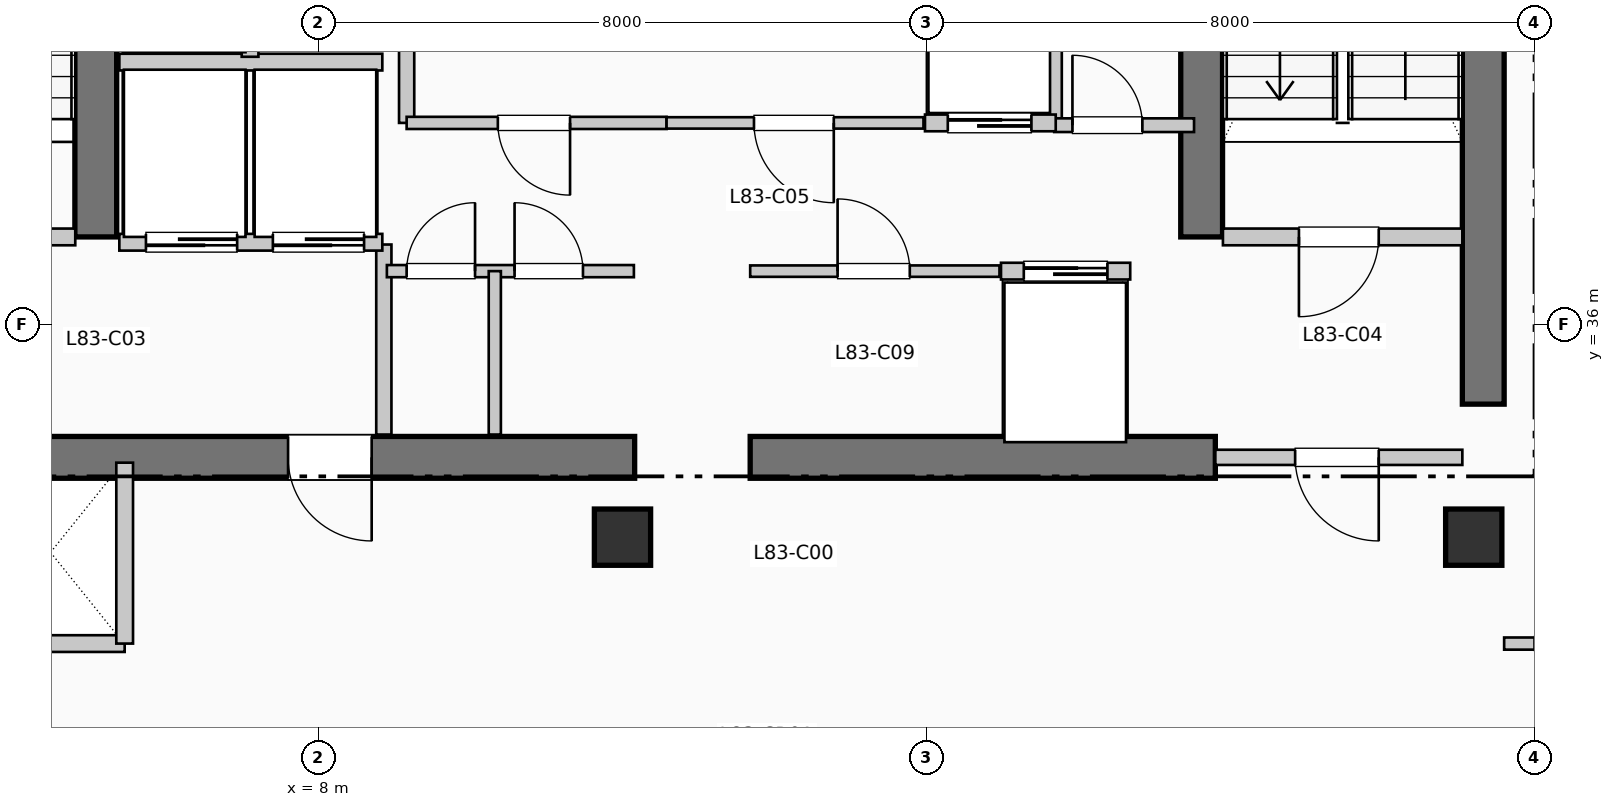
"""IFC4 building model, lengths in metres.
Left out: names, types, materials, properties, quantities, classifications, styles, units other than length and angle.
Written with IfcOpenShell. Run it as: python <this file> out.ifc"""

import sys

from ifc_helpers import new_model, si_unit, direction, frame, frame_2d, origin, origin_2d, place, context, subcontext, project, spatial, rectangle, extrude, element, fill, save


model = new_model("IFC4")
c1 = context("Model", 3, precision=1e-05, world=origin(), true_north=direction((0.0, 1.0)))
c2 = subcontext(c1, "Body", "Model", "MODEL_VIEW")
j1 = project(units=[si_unit("LENGTHUNIT", "METRE"), si_unit("PLANEANGLEUNIT", "RADIAN")], contexts=[c1])
p1 = place(None, origin())
s1 = spatial("IfcSite", under=j1, at=p1, CompositionType="ELEMENT")
p2 = place(p1, origin())
s2 = spatial("IfcBuilding", under=s1, at=p2, CompositionType="ELEMENT")
p3 = place(p2, frame((0.0, 0.0, 339.57)))
s3 = spatial("IfcBuildingStorey", under=s2, at=p3, CompositionType="ELEMENT", Elevation=339.57)
p4 = place(p3, frame((23.325, 34.95, 0.0), z_axis=(0.0, 0.0, 1.0), x_axis=(0.0, 1.0, 0.0)))
e1 = element("IfcWall", 1, at=p4, inside=s3, PredefinedType="SHEAR", context=c2, shape_type="SweptSolid", body=[
    extrude(rectangle(XDim=10.64, YDim=0.55, at=frame_2d((5.32, 0.0))), origin(), (0.0, 0.0, 1.0), 3.96),
])
p5 = place(p3, frame((1.45, 34.25, 0.0), z_axis=(0.0, 0.0, 1.0), x_axis=(1.0, 0.0, 0.0)))
e2 = element("IfcWall", 2, at=p5, inside=s3, PredefinedType="SHEAR", context=c2, shape_type="SweptSolid", body=[
    extrude(rectangle(XDim=10.71, YDim=0.55, at=frame_2d((5.355, 0.0))), origin(), (0.0, 0.0, 1.0), 3.96),
])
p6 = place(p5, frame((7.25, 0.0, 0.0), z_axis=(0.0, 0.0, 1.0), x_axis=(-1.0, 0.0, 0.0)))
e3 = element("IfcOpeningElement", 3, at=p6, cuts=e2, PredefinedType="OPENING", context=c2, shape_type="SweptSolid", body=[
    extrude(rectangle(XDim=1.1, YDim=2.15, at=frame_2d((0.55, 1.075))), frame((0.0, 0.285, 0.0), z_axis=(0.0, -1.0, 0.0), x_axis=(1.0, 0.0, 0.0)), (0.0, 0.0, 1.0), 0.57),
])
p7 = place(p3, frame((13.68, 34.25, 0.0), z_axis=(0.0, 0.0, 1.0), x_axis=(1.0, 0.0, 0.0)))
e4 = element("IfcWall", 4, at=p7, inside=s3, PredefinedType="SHEAR", context=c2, shape_type="SweptSolid", body=[
    extrude(rectangle(XDim=6.12, YDim=0.55, at=frame_2d((3.06, 0.0))), origin(), (0.0, 0.0, 1.0), 3.96),
])
for number, where, z_axis, x_axis in (
    (5, (5.07, 37.15, 0.0), (0.0, 0.0, 1.0), (0.0, 1.0, 0.0)),
    (6, (19.62, 37.15, 0.0), (0.0, 0.0, 1.0), (0.0, 1.0, 0.0)),
):
    element("IfcWall", number, at=place(p3, frame(where, z_axis=z_axis, x_axis=x_axis)), inside=s3, PredefinedType="SHEAR", context=c2, shape_type="SweptSolid", body=[
        extrude(rectangle(XDim=7.89, YDim=0.55, at=frame_2d((3.945, 0.0))), origin(), (0.0, 0.0, 1.0), 3.96),
    ])
for number, where, z_axis, x_axis in (
    (7, (12.0, 33.2, 0.0), (0.0, 0.0, 1.0), (1.0, 0.0, 0.0)),
    (8, (23.2, 33.2, 0.0), (0.0, 0.0, 1.0), (1.0, 0.0, 0.0)),
):
    element("IfcColumn", number, at=place(p3, frame(where, z_axis=z_axis, x_axis=x_axis)), inside=s3, PredefinedType="COLUMN", context=c2, shape_type="SweptSolid", body=[
        extrude(rectangle(XDim=0.74, YDim=0.74, at=origin_2d()), origin(), (0.0, 0.0, 1.0), 3.96),
    ])
p8 = place(p3, frame((1.65, 37.15, 0.0), z_axis=(0.0, 0.0, 1.0), x_axis=(1.0, 0.0, 0.0)))
e9 = element("IfcWall", 9, at=p8, inside=s3, PredefinedType="PARTITIONING", context=c2, shape_type="SweptSolid", body=[
    extrude(rectangle(XDim=3.15, YDim=0.22, at=frame_2d((1.575, 0.0))), origin(), (0.0, 0.0, 1.0), 3.74),
])
p9 = place(p8, frame((2.05, 0.0, 0.0), z_axis=(0.0, 0.0, 1.0), x_axis=(-1.0, 0.0, 0.0)))
e10 = element("IfcOpeningElement", 10, at=p9, cuts=e9, PredefinedType="OPENING", context=c2, shape_type="SweptSolid", body=[
    extrude(rectangle(XDim=1.05, YDim=2.15, at=frame_2d((0.525, 1.075))), frame((0.0, 0.12, 0.0), z_axis=(0.0, -1.0, 0.0), x_axis=(1.0, 0.0, 0.0)), (0.0, 0.0, 1.0), 0.24),
])
p10 = place(p3, frame((8.86, 34.55, 0.0), z_axis=(0.0, 0.0, 1.0), x_axis=(0.0, 1.0, 0.0)))
e11 = element("IfcWall", 11, at=p10, inside=s3, PredefinedType="PARTITIONING", context=c2, shape_type="SweptSolid", body=[
    extrude(rectangle(XDim=2.5, YDim=0.2, at=frame_2d((1.25, 0.0))), origin(), (0.0, 0.0, 1.0), 3.74),
])
p11 = place(p3, frame((19.9, 37.15, 0.0), z_axis=(0.0, 0.0, 1.0), x_axis=(1.0, 0.0, 0.0)))
e12 = element("IfcWall", 12, at=p11, inside=s3, PredefinedType="PARTITIONING", context=c2, shape_type="SweptSolid", body=[
    extrude(rectangle(XDim=3.15, YDim=0.22, at=frame_2d((1.575, 0.0))), origin(), (0.0, 0.0, 1.0), 3.74),
])
p12 = place(p11, frame((2.05, 0.0, 0.0), z_axis=(0.0, 0.0, 1.0), x_axis=(-1.0, 0.0, 0.0)))
e13 = element("IfcOpeningElement", 13, at=p12, cuts=e12, PredefinedType="OPENING", context=c2, shape_type="SweptSolid", body=[
    extrude(rectangle(XDim=1.05, YDim=2.15, at=frame_2d((0.525, 1.075))), frame((0.0, 0.12, 0.0), z_axis=(0.0, -1.0, 0.0), x_axis=(1.0, 0.0, 0.0)), (0.0, 0.0, 1.0), 0.24),
])
p13 = place(p3, frame((19.8, 34.25, 0.0), z_axis=(0.0, 0.0, 1.0), x_axis=(1.0, 0.0, 0.0)))
e14 = element("IfcWall", 14, at=p13, inside=s3, PredefinedType="PARTITIONING", context=c2, shape_type="SweptSolid", body=[
    extrude(rectangle(XDim=3.25, YDim=0.2, at=frame_2d((1.625, 0.0))), origin(), (0.0, 0.0, 1.0), 3.74),
])
p14 = place(p13, frame((2.15, 0.0, 0.0), z_axis=(0.0, 0.0, 1.0), x_axis=(-1.0, 0.0, 0.0)))
e15 = element("IfcOpeningElement", 15, at=p14, cuts=e14, PredefinedType="OPENING", context=c2, shape_type="SweptSolid", body=[
    extrude(rectangle(XDim=1.1, YDim=2.15, at=frame_2d((0.55, 1.075))), frame((0.0, 0.11, 0.0), z_axis=(0.0, -1.0, 0.0), x_axis=(1.0, 0.0, 0.0)), (0.0, 0.0, 1.0), 0.22),
])
p15 = place(p3, frame((5.38, 37.08, 0.0), z_axis=(0.0, 0.0, 1.0), x_axis=(1.0, 0.0, 0.0)))
e16 = element("IfcWall", 16, at=p15, inside=s3, PredefinedType="PARTITIONING", context=c2, shape_type="SweptSolid", body=[
    extrude(rectangle(XDim=3.46, YDim=0.22, at=frame_2d((1.73, 0.0))), origin(), (0.0, 0.0, 1.0), 3.74),
])
p16 = place(p15, frame((1.55, 0.0, 0.0), z_axis=(0.0, 0.0, 1.0), x_axis=(-1.0, 0.0, 0.0)))
e17 = element("IfcOpeningElement", 17, at=p16, cuts=e16, PredefinedType="OPENING", context=c2, shape_type="SweptSolid", body=[
    extrude(rectangle(XDim=1.2, YDim=2.2, at=frame_2d((0.6, 1.1))), frame((0.0, 0.12, 0.0), z_axis=(0.0, -1.0, 0.0), x_axis=(1.0, 0.0, 0.0)), (0.0, 0.0, 1.0), 0.24),
])
p17 = place(p15, frame((3.22, 0.0, 0.0), z_axis=(0.0, 0.0, 1.0), x_axis=(-1.0, 0.0, 0.0)))
e18 = element("IfcOpeningElement", 18, at=p17, cuts=e16, PredefinedType="OPENING", context=c2, shape_type="SweptSolid", body=[
    extrude(rectangle(XDim=1.2, YDim=2.2, at=frame_2d((0.6, 1.1))), frame((0.0, 0.12, 0.0), z_axis=(0.0, -1.0, 0.0), x_axis=(1.0, 0.0, 0.0)), (0.0, 0.0, 1.0), 0.24),
])
p18 = place(p3, frame((5.38, 39.45, 0.0), z_axis=(0.0, 0.0, 1.0), x_axis=(1.0, 0.0, 0.0)))
e19 = element("IfcWall", 19, at=p18, inside=s3, PredefinedType="PARTITIONING", context=c2, shape_type="SweptSolid", body=[
    extrude(rectangle(XDim=3.46, YDim=0.22, at=frame_2d((1.73, 0.0))), origin(), (0.0, 0.0, 1.0), 3.74),
])
p19 = place(p3, frame((7.1, 39.52, 0.0), z_axis=(0.0, 0.0, 1.0), x_axis=(0.0, 1.0, 0.0)))
e20 = element("IfcWall", 20, at=p19, inside=s3, PredefinedType="PARTITIONING", context=c2, shape_type="SweptSolid", body=[
    extrude(rectangle(XDim=2.93, YDim=0.22, at=frame_2d((1.465, 0.0))), origin(), (0.0, 0.0, 1.0), 3.74),
])
p20 = place(p19, frame((0.85, 0.0, 0.0)))
e21 = element("IfcOpeningElement", 21, at=p20, cuts=e20, PredefinedType="OPENING", context=c2, shape_type="SweptSolid", body=[
    extrude(rectangle(XDim=1.1, YDim=2.2, at=frame_2d((0.55, 1.1))), frame((0.0, 0.12, 0.0), z_axis=(0.0, -1.0, 0.0), x_axis=(1.0, 0.0, 0.0)), (0.0, 0.0, 1.0), 0.24),
])
p21 = place(p3, frame((1.55, 31.8, 0.0), z_axis=(0.0, 0.0, 1.0), x_axis=(1.0, 0.0, 0.0)))
e22 = element("IfcWall", 22, at=p21, inside=s3, PredefinedType="PARTITIONING", context=c2, shape_type="SweptSolid", body=[
    extrude(rectangle(XDim=3.9, YDim=0.22, at=frame_2d((1.95, 0.0))), origin(), (0.0, 0.0, 1.0), 3.74),
])
p22 = place(p3, frame((5.45, 31.8, 0.0), z_axis=(0.0, 0.0, 1.0), x_axis=(0.0, 1.0, 0.0)))
e23 = element("IfcWall", 23, at=p22, inside=s3, PredefinedType="PARTITIONING", context=c2, shape_type="SweptSolid", body=[
    extrude(rectangle(XDim=2.38, YDim=0.22, at=frame_2d((1.19, 0.0))), origin(), (0.0, 0.0, 1.0), 3.74),
])
for number, where, z_axis, x_axis in (
    (24, (9.16, 38.65, 0.0), (0.0, 0.0, 1.0), (0.0, 1.0, 0.0)),
    (25, (17.68, 38.65, 0.0), (0.0, 0.0, 1.0), (0.0, 1.0, 0.0)),
):
    element("IfcWall", number, at=place(p3, frame(where, z_axis=z_axis, x_axis=x_axis)), inside=s3, PredefinedType="PARTITIONING", context=c2, shape_type="SweptSolid", body=[
        extrude(rectangle(XDim=2.35, YDim=0.2, at=frame_2d((1.175, 0.0))), origin(), (0.0, 0.0, 1.0), 3.74),
    ])
p23 = place(p3, frame((17.68, 38.62, 0.0), z_axis=(0.0, 0.0, 1.0), x_axis=(1.0, 0.0, 0.0)))
e26 = element("IfcWall", 26, at=p23, inside=s3, PredefinedType="PARTITIONING", context=c2, shape_type="SweptSolid", body=[
    extrude(rectangle(XDim=1.84, YDim=0.18, at=frame_2d((0.92, 0.0))), origin(), (0.0, 0.0, 1.0), 3.74),
])
p24 = place(p23, frame((0.24, 0.0, 0.0)))
e27 = element("IfcOpeningElement", 27, at=p24, cuts=e26, PredefinedType="OPENING", context=c2, shape_type="SweptSolid", body=[
    extrude(rectangle(XDim=0.92, YDim=2.1, at=frame_2d((0.46, 1.05))), frame((0.0, 0.1, 0.0), z_axis=(0.0, -1.0, 0.0), x_axis=(1.0, 0.0, 0.0)), (0.0, 0.0, 1.0), 0.2),
])
p25 = place(p3, frame((8.9, 36.7, 0.0), z_axis=(0.0, 0.0, 1.0), x_axis=(1.0, 0.0, 0.0)))
e28 = element("IfcWall", 28, at=p25, inside=s3, PredefinedType="PARTITIONING", context=c2, shape_type="SweptSolid", body=[
    extrude(rectangle(XDim=3.25, YDim=0.16, at=frame_2d((1.625, 0.0))), origin(), (0.0, 0.0, 1.0), 3.74),
])
p26 = place(p25, frame((0.26, 0.0, 0.0)))
e29 = element("IfcOpeningElement", 29, at=p26, cuts=e28, PredefinedType="OPENING", context=c2, shape_type="SweptSolid", body=[
    extrude(rectangle(XDim=0.9, YDim=2.15, at=frame_2d((0.45, 1.075))), frame((0.0, 0.09, 0.0), z_axis=(0.0, -1.0, 0.0), x_axis=(1.0, 0.0, 0.0)), (0.0, 0.0, 1.0), 0.18),
])
p27 = place(p25, frame((1.68, 0.0, 0.0)))
e30 = element("IfcOpeningElement", 30, at=p27, cuts=e28, PredefinedType="OPENING", context=c2, shape_type="SweptSolid", body=[
    extrude(rectangle(XDim=0.9, YDim=2.15, at=frame_2d((0.45, 1.075))), frame((0.0, 0.09, 0.0), z_axis=(0.0, -1.0, 0.0), x_axis=(1.0, 0.0, 0.0)), (0.0, 0.0, 1.0), 0.18),
])
p28 = place(p3, frame((10.32, 34.55, 0.0), z_axis=(0.0, 0.0, 1.0), x_axis=(0.0, 1.0, 0.0)))
e31 = element("IfcWall", 31, at=p28, inside=s3, PredefinedType="PARTITIONING", context=c2, shape_type="SweptSolid", body=[
    extrude(rectangle(XDim=2.15, YDim=0.16, at=frame_2d((1.075, 0.0))), origin(), (0.0, 0.0, 1.0), 3.74),
])
p29 = place(p3, frame((9.16, 38.65, 0.0), z_axis=(0.0, 0.0, 1.0), x_axis=(1.0, 0.0, 0.0)))
e32 = element("IfcWall", 32, at=p29, inside=s3, PredefinedType="PARTITIONING", context=c2, shape_type="SweptSolid", body=[
    extrude(rectangle(XDim=3.42, YDim=0.16, at=frame_2d((1.71, 0.0))), origin(), (0.0, 0.0, 1.0), 3.74),
])
p30 = place(p29, frame((2.15, 0.0, 0.0), z_axis=(0.0, 0.0, 1.0), x_axis=(-1.0, 0.0, 0.0)))
e33 = element("IfcOpeningElement", 33, at=p30, cuts=e32, PredefinedType="OPENING", context=c2, shape_type="SweptSolid", body=[
    extrude(rectangle(XDim=0.95, YDim=2.15, at=frame_2d((0.475, 1.075))), frame((0.0, 0.09, 0.0), z_axis=(0.0, -1.0, 0.0), x_axis=(1.0, 0.0, 0.0)), (0.0, 0.0, 1.0), 0.18),
])
p31 = place(p3, frame((13.68, 36.7, 0.0), z_axis=(0.0, 0.0, 1.0), x_axis=(1.0, 0.0, 0.0)))
e34 = element("IfcWall", 34, at=p31, inside=s3, PredefinedType="PARTITIONING", context=c2, shape_type="SweptSolid", body=[
    extrude(rectangle(XDim=3.28, YDim=0.15, at=frame_2d((1.64, 0.0))), origin(), (0.0, 0.0, 1.0), 3.74),
])
p32 = place(p31, frame((1.15, 0.0, 0.0)))
e35 = element("IfcOpeningElement", 35, at=p32, cuts=e34, PredefinedType="OPENING", context=c2, shape_type="SweptSolid", body=[
    extrude(rectangle(XDim=0.95, YDim=2.15, at=frame_2d((0.475, 1.075))), frame((0.0, 0.085, 0.0), z_axis=(0.0, -1.0, 0.0), x_axis=(1.0, 0.0, 0.0)), (0.0, 0.0, 1.0), 0.17),
])
p33 = place(p3, frame((12.58, 38.65, 0.0), z_axis=(0.0, 0.0, 1.0), x_axis=(1.0, 0.0, 0.0)))
e36 = element("IfcWall", 36, at=p33, inside=s3, PredefinedType="PARTITIONING", context=c2, shape_type="SweptSolid", body=[
    extrude(rectangle(XDim=3.38, YDim=0.15, at=frame_2d((1.69, 0.0))), origin(), (0.0, 0.0, 1.0), 3.74),
])
p34 = place(p33, frame((2.2, 0.0, 0.0), z_axis=(0.0, 0.0, 1.0), x_axis=(-1.0, 0.0, 0.0)))
e37 = element("IfcOpeningElement", 37, at=p34, cuts=e36, PredefinedType="OPENING", context=c2, shape_type="SweptSolid", body=[
    extrude(rectangle(XDim=1.05, YDim=2.15, at=frame_2d((0.525, 1.075))), frame((0.0, 0.085, 0.0), z_axis=(0.0, -1.0, 0.0), x_axis=(1.0, 0.0, 0.0)), (0.0, 0.0, 1.0), 0.17),
])
p35 = place(p3, frame((16.98, 36.7, 0.0), z_axis=(0.0, 0.0, 1.0), x_axis=(1.0, 0.0, 0.0)))
e38 = element("IfcWall", 38, at=p35, inside=s3, PredefinedType="PARTITIONING", context=c2, shape_type="SweptSolid", body=[
    extrude(rectangle(XDim=1.7, YDim=0.22, at=frame_2d((0.85, 0.0))), origin(), (0.0, 0.0, 1.0), 3.74),
])
p36 = place(p35, frame((0.3, 0.0, 0.0)))
e39 = element("IfcOpeningElement", 39, at=p36, cuts=e38, PredefinedType="OPENING", context=c2, shape_type="SweptSolid", body=[
    extrude(rectangle(XDim=1.1, YDim=2.2, at=frame_2d((0.55, 1.1))), frame((0.0, 0.12, 0.0), z_axis=(0.0, -1.0, 0.0), x_axis=(1.0, 0.0, 0.0)), (0.0, 0.0, 1.0), 0.24),
])
p37 = place(p3, frame((15.98, 38.65, 0.0), z_axis=(0.0, 0.0, 1.0), x_axis=(1.0, 0.0, 0.0)))
e40 = element("IfcWall", 40, at=p37, inside=s3, PredefinedType="PARTITIONING", context=c2, shape_type="SweptSolid", body=[
    extrude(rectangle(XDim=1.72, YDim=0.22, at=frame_2d((0.86, 0.0))), origin(), (0.0, 0.0, 1.0), 3.74),
])
p38 = place(p37, frame((0.3, 0.0, 0.0)))
e41 = element("IfcOpeningElement", 41, at=p38, cuts=e40, PredefinedType="OPENING", context=c2, shape_type="SweptSolid", body=[
    extrude(rectangle(XDim=1.1, YDim=2.2, at=frame_2d((0.55, 1.1))), frame((0.0, 0.12, 0.0), z_axis=(0.0, -1.0, 0.0), x_axis=(1.0, 0.0, 0.0)), (0.0, 0.0, 1.0), 0.24),
])
p39 = place(p3, frame((23.6, 31.8, 0.0), z_axis=(0.0, 0.0, 1.0), x_axis=(1.0, 0.0, 0.0)))
e42 = element("IfcWall", 42, at=p39, inside=s3, PredefinedType="PARTITIONING", context=c2, shape_type="SweptSolid", body=[
    extrude(rectangle(XDim=1.8, YDim=0.16, at=frame_2d((0.9, 0.0))), origin(), (0.0, 0.0, 1.0), 3.74),
])
p40 = place(p39, frame((0.4, 0.0, 0.0)))
e43 = element("IfcOpeningElement", 43, at=p40, cuts=e42, PredefinedType="OPENING", context=c2, shape_type="SweptSolid", body=[
    extrude(rectangle(XDim=0.92, YDim=2.1, at=frame_2d((0.46, 1.05))), frame((0.0, 0.09, 0.0), z_axis=(0.0, -1.0, 0.0), x_axis=(1.0, 0.0, 0.0)), (0.0, 0.0, 1.0), 0.18),
])
p41 = place(p6, origin())
e44 = element("IfcDoor", 44, at=p41, inside=s3, OperationType="SINGLE_SWING_RIGHT", PredefinedType="DOOR", context=c2, shape_type="SweptSolid", body=[
    extrude(rectangle(XDim=1.1, YDim=2.15, at=frame_2d((0.55, 1.075))), frame((0.0, 0.025, 0.0), z_axis=(0.0, -1.0, 0.0), x_axis=(1.0, 0.0, 0.0)), (0.0, 0.0, 1.0), 0.05),
])
fill(e3, e44)
p42 = place(p12, origin())
e45 = element("IfcDoor", 45, at=p42, inside=s3, OperationType="SINGLE_SWING_LEFT", PredefinedType="DOOR", context=c2, shape_type="SweptSolid", body=[
    extrude(rectangle(XDim=1.05, YDim=2.15, at=frame_2d((0.525, 1.075))), frame((0.0, 0.025, 0.0), z_axis=(0.0, -1.0, 0.0), x_axis=(1.0, 0.0, 0.0)), (0.0, 0.0, 1.0), 0.05),
])
fill(e13, e45)
p43 = place(p14, origin())
e46 = element("IfcDoor", 46, at=p43, inside=s3, OperationType="SINGLE_SWING_RIGHT", PredefinedType="DOOR", context=c2, shape_type="SweptSolid", body=[
    extrude(rectangle(XDim=1.1, YDim=2.15, at=frame_2d((0.55, 1.075))), frame((0.0, 0.025, 0.0), z_axis=(0.0, -1.0, 0.0), x_axis=(1.0, 0.0, 0.0)), (0.0, 0.0, 1.0), 0.05),
])
fill(e15, e46)
p44 = place(p16, origin())
e47 = element("IfcDoor", 47, at=p44, inside=s3, OperationType="SLIDING_TO_RIGHT", PredefinedType="DOOR", context=c2, shape_type="SweptSolid", body=[
    extrude(rectangle(XDim=1.2, YDim=2.2, at=frame_2d((0.6, 1.1))), frame((0.0, 0.025, 0.0), z_axis=(0.0, -1.0, 0.0), x_axis=(1.0, 0.0, 0.0)), (0.0, 0.0, 1.0), 0.05),
])
fill(e17, e47)
p45 = place(p17, origin())
e48 = element("IfcDoor", 48, at=p45, inside=s3, OperationType="SLIDING_TO_RIGHT", PredefinedType="DOOR", context=c2, shape_type="SweptSolid", body=[
    extrude(rectangle(XDim=1.2, YDim=2.2, at=frame_2d((0.6, 1.1))), frame((0.0, 0.025, 0.0), z_axis=(0.0, -1.0, 0.0), x_axis=(1.0, 0.0, 0.0)), (0.0, 0.0, 1.0), 0.05),
])
fill(e18, e48)
p46 = place(p24, origin())
e49 = element("IfcDoor", 49, at=p46, inside=s3, OperationType="SINGLE_SWING_LEFT", PredefinedType="DOOR", context=c2, shape_type="SweptSolid", body=[
    extrude(rectangle(XDim=0.92, YDim=2.1, at=frame_2d((0.46, 1.05))), frame((0.0, 0.025, 0.0), z_axis=(0.0, -1.0, 0.0), x_axis=(1.0, 0.0, 0.0)), (0.0, 0.0, 1.0), 0.05),
])
fill(e27, e49)
p47 = place(p26, origin())
e50 = element("IfcDoor", 50, at=p47, inside=s3, OperationType="SINGLE_SWING_RIGHT", PredefinedType="DOOR", context=c2, shape_type="SweptSolid", body=[
    extrude(rectangle(XDim=0.9, YDim=2.15, at=frame_2d((0.45, 1.075))), frame((0.0, 0.025, 0.0), z_axis=(0.0, -1.0, 0.0), x_axis=(1.0, 0.0, 0.0)), (0.0, 0.0, 1.0), 0.05),
])
fill(e29, e50)
p48 = place(p27, origin())
e51 = element("IfcDoor", 51, at=p48, inside=s3, OperationType="SINGLE_SWING_LEFT", PredefinedType="DOOR", context=c2, shape_type="SweptSolid", body=[
    extrude(rectangle(XDim=0.9, YDim=2.15, at=frame_2d((0.45, 1.075))), frame((0.0, 0.025, 0.0), z_axis=(0.0, -1.0, 0.0), x_axis=(1.0, 0.0, 0.0)), (0.0, 0.0, 1.0), 0.05),
])
fill(e30, e51)
p49 = place(p30, origin())
e52 = element("IfcDoor", 52, at=p49, inside=s3, OperationType="SINGLE_SWING_RIGHT", PredefinedType="DOOR", context=c2, shape_type="SweptSolid", body=[
    extrude(rectangle(XDim=0.95, YDim=2.15, at=frame_2d((0.475, 1.075))), frame((0.0, 0.025, 0.0), z_axis=(0.0, -1.0, 0.0), x_axis=(1.0, 0.0, 0.0)), (0.0, 0.0, 1.0), 0.05),
])
fill(e33, e52)
p50 = place(p32, origin())
e53 = element("IfcDoor", 53, at=p50, inside=s3, OperationType="SINGLE_SWING_LEFT", PredefinedType="DOOR", context=c2, shape_type="SweptSolid", body=[
    extrude(rectangle(XDim=0.95, YDim=2.15, at=frame_2d((0.475, 1.075))), frame((0.0, 0.025, 0.0), z_axis=(0.0, -1.0, 0.0), x_axis=(1.0, 0.0, 0.0)), (0.0, 0.0, 1.0), 0.05),
])
fill(e35, e53)
p51 = place(p34, origin())
e54 = element("IfcDoor", 54, at=p51, inside=s3, OperationType="SINGLE_SWING_RIGHT", PredefinedType="DOOR", context=c2, shape_type="SweptSolid", body=[
    extrude(rectangle(XDim=1.05, YDim=2.15, at=frame_2d((0.525, 1.075))), frame((0.0, 0.025, 0.0), z_axis=(0.0, -1.0, 0.0), x_axis=(1.0, 0.0, 0.0)), (0.0, 0.0, 1.0), 0.05),
])
fill(e37, e54)
p52 = place(p36, origin())
e55 = element("IfcDoor", 55, at=p52, inside=s3, OperationType="SLIDING_TO_LEFT", PredefinedType="DOOR", context=c2, shape_type="SweptSolid", body=[
    extrude(rectangle(XDim=1.1, YDim=2.2, at=frame_2d((0.55, 1.1))), frame((0.0, 0.025, 0.0), z_axis=(0.0, -1.0, 0.0), x_axis=(1.0, 0.0, 0.0)), (0.0, 0.0, 1.0), 0.05),
])
fill(e39, e55)
p53 = place(p38, origin())
e56 = element("IfcDoor", 56, at=p53, inside=s3, OperationType="SLIDING_TO_LEFT", PredefinedType="DOOR", context=c2, shape_type="SweptSolid", body=[
    extrude(rectangle(XDim=1.1, YDim=2.2, at=frame_2d((0.55, 1.1))), frame((0.0, 0.025, 0.0), z_axis=(0.0, -1.0, 0.0), x_axis=(1.0, 0.0, 0.0)), (0.0, 0.0, 1.0), 0.05),
])
fill(e41, e56)
save(model, sys.argv[1])
